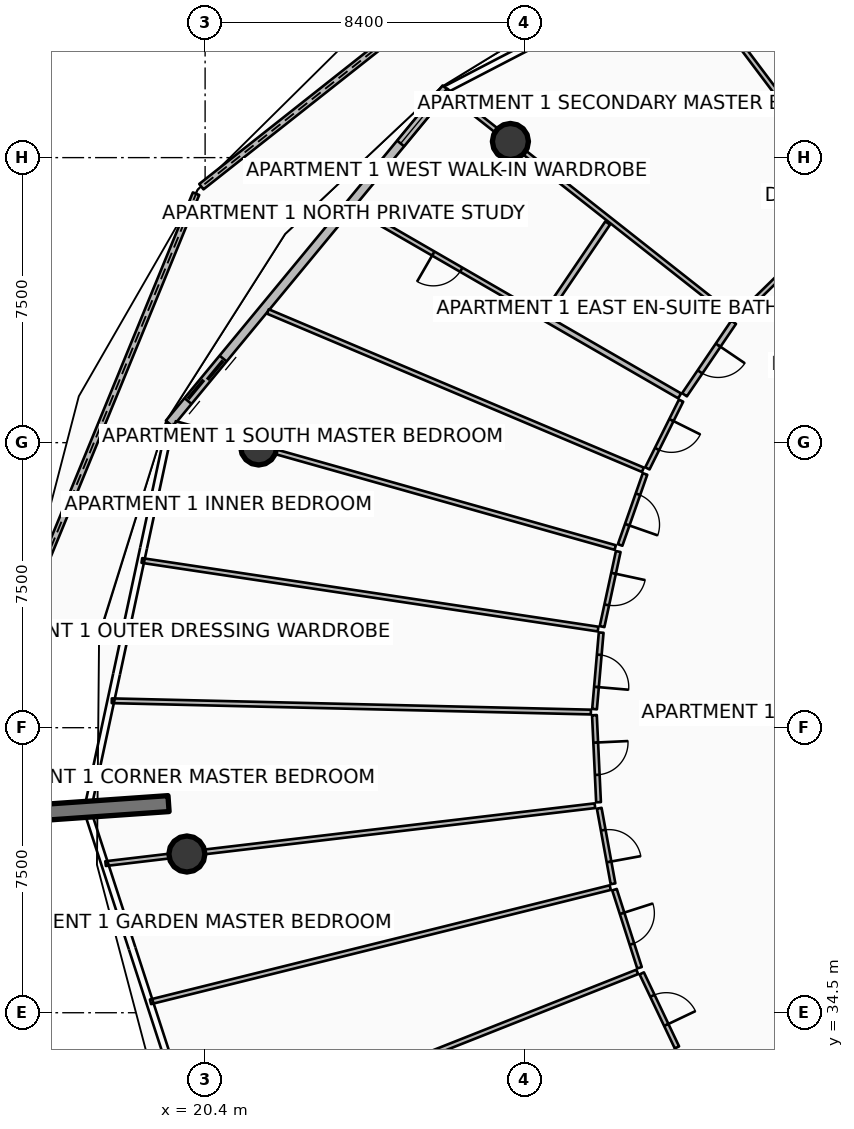
"""IFC4 building model, lengths in metres.
Left out: names, types, materials, properties, quantities, classifications, styles, units other than length and angle.
Written with IfcOpenShell. Run it as: python <this file> out.ifc"""

import sys

from ifc_helpers import new_model, si_unit, direction, frame, frame_2d, origin, origin_2d, place, context, subcontext, project, spatial, polyline, rectangle, circle, outline, extrude, element, fill, save


model = new_model("IFC4")
c1 = context("Model", 3, precision=1e-05, world=origin(), true_north=direction((0.0, 1.0)))
c2 = subcontext(c1, "Body", "Model", "MODEL_VIEW")
j1 = project(units=[si_unit("LENGTHUNIT", "METRE"), si_unit("PLANEANGLEUNIT", "RADIAN")], contexts=[c1])
p1 = place(None, origin())
s1 = spatial("IfcSite", under=j1, at=p1, CompositionType="ELEMENT")
p2 = place(p1, origin())
s2 = spatial("IfcBuilding", under=s1, at=p2, CompositionType="ELEMENT")
p3 = place(p2, frame((0.0, 0.0, 267.5)))
s3 = spatial("IfcBuildingStorey", under=s2, at=p3, CompositionType="ELEMENT", Elevation=267.5)
p4 = place(p3, frame((19.438, 40.003, 0.0), z_axis=(0.0, 0.0, 1.0), x_axis=(-0.997563824095, -0.069759707979, 0.0)))
e1 = element("IfcWall", 1, at=p4, inside=s3, PredefinedType="SOLIDWALL", context=c2, shape_type="SweptSolid", body=[
    extrude(rectangle(XDim=3.5, YDim=0.42, at=frame_2d((1.75, 0.0))), origin(), (0.0, 0.0, 1.0), 3.85),
])
for number, where, z_axis, x_axis in (
    (2, (28.434, 57.425, 0.0), (0.0, 0.0, 1.0), (1.0, 0.0, 0.0)),
    (3, (21.809, 49.387, 0.0), (0.0, 0.0, 1.0), (1.0, 0.0, 0.0)),
    (4, (19.92, 38.677, 0.0), (0.0, 0.0, 1.0), (1.0, 0.0, 0.0)),
):
    element("IfcColumn", number, at=place(p3, frame(where, z_axis=z_axis, x_axis=x_axis)), inside=s3, PredefinedType="COLUMN", context=c2, shape_type="SweptSolid", body=[
        extrude(circle(Radius=0.475, at=origin_2d()), origin(), (0.0, 0.0, 1.0), 3.59),
    ])
p5 = place(p3, frame((29.443, 63.461, 0.0), z_axis=(0.0, 0.0, 1.0), x_axis=(-0.784536716277, -0.620082366153, 0.0)))
e5 = element("IfcWall", 5, at=p5, inside=s3, PredefinedType="PARAPET", context=c2, shape_type="SweptSolid", body=[
    extrude(outline(polyline([(0.0, 0.0), (11.652, 0.0), (11.652, 1.832), (5.826, 1.853), (0.0, 1.756), (0.0, 0.0)])), frame((0.0, 0.09, 0.0), z_axis=(0.0, -1.0, 0.0), x_axis=(1.0, 0.0, 0.0)), (0.0, 0.0, 1.0), 0.18),
])
p6 = place(p3, frame((20.162, 56.05, 0.0), z_axis=(0.0, 0.0, 1.0), x_axis=(-0.3796059491, -0.92514827104, 0.0)))
e6 = element("IfcWall", 6, at=p6, inside=s3, PredefinedType="PARAPET", context=c2, shape_type="SweptSolid", body=[
    extrude(outline(polyline([(0.0, 0.0), (12.209, 0.0), (12.208, 1.497), (6.104, 1.696), (0.0, 1.832), (0.0, 0.0)])), frame((0.0, 0.09, 0.0), z_axis=(0.0, -1.0, 0.0), x_axis=(1.0, 0.0, 0.0)), (0.0, 0.0, 1.0), 0.18),
])
p7 = place(p3, frame((26.742, 58.822, 0.0), z_axis=(0.0, 0.0, 1.0), x_axis=(-0.636680093065, -0.771128043255, 0.0)))
e7 = element("IfcWall", 7, at=p7, inside=s3, PredefinedType="SOLIDWALL", context=c2, shape_type="SweptSolid", body=[
    extrude(rectangle(XDim=11.438, YDim=0.24, at=frame_2d((5.719, 0.0))), origin(), (0.0, 0.0, 1.0), 2.54),
])
p8 = place(p7, frame((9.218, 0.0, 0.0)))
e8 = element("IfcOpeningElement", 8, at=p8, cuts=e7, PredefinedType="OPENING", context=c2, shape_type="SweptSolid", body=[
    extrude(rectangle(XDim=1.45, YDim=2.15, at=frame_2d((0.725, 1.075))), frame((0.0, 0.13, 0.0), z_axis=(0.0, -1.0, 0.0), x_axis=(1.0, 0.0, 0.0)), (0.0, 0.0, 1.0), 0.26),
])
p9 = place(p7, frame((0.28, 0.0, 0.65)))
e9 = element("IfcOpeningElement", 9, at=p9, cuts=e7, PredefinedType="OPENING", context=c2, shape_type="SweptSolid", body=[
    extrude(rectangle(XDim=1.6, YDim=1.5, at=frame_2d((0.8, 0.75))), frame((0.0, 0.13, 0.0), z_axis=(0.0, -1.0, 0.0), x_axis=(1.0, 0.0, 0.0)), (0.0, 0.0, 1.0), 0.26),
])
p10 = place(p3, frame((37.509, 55.949, 0.0), z_axis=(0.0, 0.0, 1.0), x_axis=(-0.60104674722, 0.799213868534, 0.0)))
e10 = element("IfcWall", 10, at=p10, inside=s3, PredefinedType="PARTITIONING", context=c2, shape_type="SweptSolid", body=[
    extrude(rectangle(XDim=7.572, YDim=0.125, at=frame_2d((3.786, 0.0))), origin(), (0.0, 0.0, 1.0), 3.03),
])
p11 = place(p3, frame((37.506, 55.822, 0.0), z_axis=(0.0, 0.0, 1.0), x_axis=(-0.715105814901, -0.699016218334, 0.0)))
e11 = element("IfcWall", 11, at=p11, inside=s3, PredefinedType="PARTITIONING", context=c2, shape_type="SweptSolid", body=[
    extrude(rectangle(XDim=4.294, YDim=0.125, at=frame_2d((2.147, 0.0))), origin(), (0.0, 0.0, 1.0), 2.957),
])
p12 = place(p11, frame((1.697, 0.0, 0.0)))
e12 = element("IfcOpeningElement", 12, at=p12, cuts=e11, PredefinedType="OPENING", context=c2, shape_type="SweptSolid", body=[
    extrude(rectangle(XDim=0.9, YDim=2.08, at=frame_2d((0.45, 1.04))), frame((0.0, 0.073, 0.0), z_axis=(0.0, -1.0, 0.0), x_axis=(1.0, 0.0, 0.0)), (0.0, 0.0, 1.0), 0.145),
])
p13 = place(p3, frame((34.285, 52.812, 0.0), z_axis=(0.0, 0.0, 1.0), x_axis=(-0.785324921183, 0.619083813526, 0.0)))
e13 = element("IfcWall", 13, at=p13, inside=s3, PredefinedType="PARTITIONING", context=c2, shape_type="SweptSolid", body=[
    extrude(rectangle(XDim=9.621, YDim=0.125, at=frame_2d((4.811, 0.0))), origin(), (0.0, 0.0, 1.0), 2.957),
])
p14 = place(p3, frame((34.308, 52.667, 0.0), z_axis=(0.0, 0.0, 1.0), x_axis=(-0.561141072409, -0.827720180288, 0.0)))
e14 = element("IfcWall", 14, at=p14, inside=s3, PredefinedType="PARTITIONING", context=c2, shape_type="SweptSolid", body=[
    extrude(rectangle(XDim=2.303, YDim=0.15, at=frame_2d((1.152, 0.0))), origin(), (0.0, 0.0, 1.0), 2.957),
])
p15 = place(p14, frame((0.727, 0.0, 0.0)))
e15 = element("IfcOpeningElement", 15, at=p15, cuts=e14, PredefinedType="OPENING", context=c2, shape_type="SweptSolid", body=[
    extrude(rectangle(XDim=0.85, YDim=2.06, at=frame_2d((0.425, 1.03))), frame((0.0, 0.085, 0.0), z_axis=(0.0, -1.0, 0.0), x_axis=(1.0, 0.0, 0.0)), (0.0, 0.0, 1.0), 0.17),
])
p16 = place(p3, frame((30.994, 55.28, 0.0), z_axis=(0.0, 0.0, 1.0), x_axis=(-0.561093021969, -0.827752753361, 0.0)))
e16 = element("IfcWall", 16, at=p16, inside=s3, PredefinedType="PARTITIONING", context=c2, shape_type="SweptSolid", body=[
    extrude(rectangle(XDim=2.91, YDim=0.15, at=frame_2d((1.455, 0.0))), origin(), (0.0, 0.0, 1.0), 2.957),
])
p17 = place(p3, frame((32.887, 50.731, 0.0), z_axis=(0.0, 0.0, 1.0), x_axis=(-0.865897249189, 0.500221904605, 0.0)))
e17 = element("IfcWall", 17, at=p17, inside=s3, PredefinedType="PARTITIONING", context=c2, shape_type="SweptSolid", body=[
    extrude(rectangle(XDim=4.09, YDim=0.15, at=frame_2d((2.045, 0.0))), origin(), (0.0, 0.0, 1.0), 3.03),
])
p18 = place(p3, frame((29.233, 52.842, 0.0), z_axis=(0.0, 0.0, 1.0), x_axis=(-0.865885749935, 0.500241809588, 0.0)))
e18 = element("IfcWall", 18, at=p18, inside=s3, PredefinedType="PARTITIONING", context=c2, shape_type="SweptSolid", body=[
    extrude(rectangle(XDim=5.683, YDim=0.125, at=frame_2d((2.841, 0.0))), origin(), (0.0, 0.0, 1.0), 3.03),
])
p19 = place(p18, frame((2.417, 0.0, 0.0)))
e19 = element("IfcOpeningElement", 19, at=p19, cuts=e18, PredefinedType="OPENING", context=c2, shape_type="SweptSolid", body=[
    extrude(rectangle(XDim=0.85, YDim=2.06, at=frame_2d((0.425, 1.03))), frame((0.0, 0.073, 0.0), z_axis=(0.0, -1.0, 0.0), x_axis=(1.0, 0.0, 0.0)), (0.0, 0.0, 1.0), 0.145),
])
p20 = place(p3, frame((31.92, 48.787, 0.0), z_axis=(0.0, 0.0, 1.0), x_axis=(-0.92130726737, 0.388835336731, 0.0)))
e20 = element("IfcWall", 20, at=p20, inside=s3, PredefinedType="PARTITIONING", context=c2, shape_type="SweptSolid", body=[
    extrude(rectangle(XDim=10.712, YDim=0.125, at=frame_2d((5.356, 0.0))), origin(), (0.0, 0.0, 1.0), 3.03),
])
p21 = place(p3, frame((32.925, 50.605, 0.0), z_axis=(0.0, 0.0, 1.0), x_axis=(-0.445446150764, -0.895308732656, 0.0)))
e21 = element("IfcWall", 21, at=p21, inside=s3, PredefinedType="PARTITIONING", context=c2, shape_type="SweptSolid", body=[
    extrude(rectangle(XDim=1.99, YDim=0.125, at=frame_2d((0.995, 0.0))), origin(), (0.0, 0.0, 1.0), 3.03),
])
p22 = place(p21, frame((0.57, 0.0, 0.0)))
e22 = element("IfcOpeningElement", 22, at=p22, cuts=e21, PredefinedType="OPENING", context=c2, shape_type="SweptSolid", body=[
    extrude(rectangle(XDim=0.85, YDim=2.06, at=frame_2d((0.425, 1.03))), frame((0.0, 0.073, 0.0), z_axis=(0.0, -1.0, 0.0), x_axis=(1.0, 0.0, 0.0)), (0.0, 0.0, 1.0), 0.145),
])
p23 = place(p3, frame((31.976, 48.677, 0.0), z_axis=(0.0, 0.0, 1.0), x_axis=(-0.330762244327, -0.943714118644, 0.0)))
e23 = element("IfcWall", 23, at=p23, inside=s3, PredefinedType="PARTITIONING", context=c2, shape_type="SweptSolid", body=[
    extrude(rectangle(XDim=1.98, YDim=0.125, at=frame_2d((0.99, 0.0))), origin(), (0.0, 0.0, 1.0), 2.957),
])
p24 = place(p23, frame((0.565, 0.0, 0.0)))
e24 = element("IfcOpeningElement", 24, at=p24, cuts=e23, PredefinedType="OPENING", context=c2, shape_type="SweptSolid", body=[
    extrude(rectangle(XDim=0.85, YDim=2.06, at=frame_2d((0.425, 1.03))), frame((0.0, 0.073, 0.0), z_axis=(0.0, -1.0, 0.0), x_axis=(1.0, 0.0, 0.0)), (0.0, 0.0, 1.0), 0.145),
])
p25 = place(p3, frame((31.192, 46.74, 0.0), z_axis=(0.0, 0.0, 1.0), x_axis=(-0.962454841417, 0.271441850554, 0.0)))
e25 = element("IfcWall", 25, at=p25, inside=s3, PredefinedType="PARTITIONING", context=c2, shape_type="SweptSolid", body=[
    extrude(rectangle(XDim=12.031, YDim=0.125, at=frame_2d((6.016, 0.0))), origin(), (0.0, 0.0, 1.0), 2.957),
])
p26 = place(p3, frame((30.74, 44.595, 0.0), z_axis=(0.0, 0.0, 1.0), x_axis=(-0.988886285118, 0.148673854813, 0.0)))
e26 = element("IfcWall", 26, at=p26, inside=s3, PredefinedType="PARTITIONING", context=c2, shape_type="SweptSolid", body=[
    extrude(rectangle(XDim=12.139, YDim=0.125, at=frame_2d((6.069, 0.0))), origin(), (0.0, 0.0, 1.0), 3.03),
])
p27 = place(p3, frame((30.551, 42.411, 0.0), z_axis=(0.0, 0.0, 1.0), x_axis=(-0.999722360085, 0.023562740626, 0.0)))
e27 = element("IfcWall", 27, at=p27, inside=s3, PredefinedType="PARTITIONING", context=c2, shape_type="SweptSolid", body=[
    extrude(rectangle(XDim=12.61, YDim=0.125, at=frame_2d((6.305, 0.0))), origin(), (0.0, 0.0, 1.0), 3.03),
])
p28 = place(p3, frame((31.271, 46.635, 0.0), z_axis=(0.0, 0.0, 1.0), x_axis=(-0.210477911791, -0.97759861326, 0.0)))
e28 = element("IfcWall", 28, at=p28, inside=s3, PredefinedType="PARTITIONING", context=c2, shape_type="SweptSolid", body=[
    extrude(rectangle(XDim=2.021, YDim=0.125, at=frame_2d((1.01, 0.0))), origin(), (0.0, 0.0, 1.0), 2.957),
])
p29 = place(p28, frame((0.585, 0.0, 0.0)))
e29 = element("IfcOpeningElement", 29, at=p29, cuts=e28, PredefinedType="OPENING", context=c2, shape_type="SweptSolid", body=[
    extrude(rectangle(XDim=0.85, YDim=2.06, at=frame_2d((0.425, 1.03))), frame((0.0, 0.073, 0.0), z_axis=(0.0, -1.0, 0.0), x_axis=(1.0, 0.0, 0.0)), (0.0, 0.0, 1.0), 0.145),
])
p30 = place(p3, frame((30.822, 44.502, 0.0), z_axis=(0.0, 0.0, 1.0), x_axis=(-0.086275045339, -0.996271356886, 0.0)))
e30 = element("IfcWall", 30, at=p30, inside=s3, PredefinedType="PARTITIONING", context=c2, shape_type="SweptSolid", body=[
    extrude(rectangle(XDim=2.021, YDim=0.125, at=frame_2d((1.01, 0.0))), origin(), (0.0, 0.0, 1.0), 3.03),
])
p31 = place(p30, frame((0.585, 0.0, 0.0)))
e31 = element("IfcOpeningElement", 31, at=p31, cuts=e30, PredefinedType="OPENING", context=c2, shape_type="SweptSolid", body=[
    extrude(rectangle(XDim=0.85, YDim=2.06, at=frame_2d((0.425, 1.03))), frame((0.0, 0.073, 0.0), z_axis=(0.0, -1.0, 0.0), x_axis=(1.0, 0.0, 0.0)), (0.0, 0.0, 1.0), 0.145),
])
p32 = place(p3, frame((30.645, 42.329, 0.0), z_axis=(0.0, 0.0, 1.0), x_axis=(0.047175561804, -0.998886613369, 0.0)))
e32 = element("IfcWall", 32, at=p32, inside=s3, PredefinedType="PARTITIONING", context=c2, shape_type="SweptSolid", body=[
    extrude(rectangle(XDim=2.292, YDim=0.125, at=frame_2d((1.146, 0.0))), origin(), (0.0, 0.0, 1.0), 2.957),
])
p33 = place(p32, frame((0.721, 0.0, 0.0)))
e33 = element("IfcOpeningElement", 33, at=p33, cuts=e32, PredefinedType="OPENING", context=c2, shape_type="SweptSolid", body=[
    extrude(rectangle(XDim=0.85, YDim=2.06, at=frame_2d((0.425, 1.03))), frame((0.0, 0.073, 0.0), z_axis=(0.0, -1.0, 0.0), x_axis=(1.0, 0.0, 0.0)), (0.0, 0.0, 1.0), 0.145),
])
p34 = place(p3, frame((30.657, 39.947, 0.0), z_axis=(0.0, 0.0, 1.0), x_axis=(-0.99306861519, -0.117536060525, 0.0)))
e34 = element("IfcWall", 34, at=p34, inside=s3, PredefinedType="PARTITIONING", context=c2, shape_type="SweptSolid", body=[
    extrude(rectangle(XDim=12.966, YDim=0.125, at=frame_2d((6.483, 0.0))), origin(), (0.0, 0.0, 1.0), 2.957),
])
p35 = place(p3, frame((31.061, 37.792, 0.0), z_axis=(0.0, 0.0, 1.0), x_axis=(-0.970505468857, -0.241079105105, 0.0)))
e35 = element("IfcWall", 35, at=p35, inside=s3, PredefinedType="PARTITIONING", context=c2, shape_type="SweptSolid", body=[
    extrude(rectangle(XDim=12.465, YDim=0.125, at=frame_2d((6.233, 0.0))), origin(), (0.0, 0.0, 1.0), 3.03),
])
p36 = place(p3, frame((31.772, 35.575, 0.0), z_axis=(0.0, 0.0, 1.0), x_axis=(-0.929777389871, -0.368122269476, 0.0)))
e36 = element("IfcWall", 36, at=p36, inside=s3, PredefinedType="PARTITIONING", context=c2, shape_type="SweptSolid", body=[
    extrude(rectangle(XDim=12.45, YDim=0.125, at=frame_2d((6.225, 0.0))), origin(), (0.0, 0.0, 1.0), 3.03),
])
p37 = place(p3, frame((30.771, 39.88, 0.0), z_axis=(0.0, 0.0, 1.0), x_axis=(0.17966153972, -0.983728484464, 0.0)))
e37 = element("IfcWall", 37, at=p37, inside=s3, PredefinedType="PARTITIONING", context=c2, shape_type="SweptSolid", body=[
    extrude(rectangle(XDim=2.021, YDim=0.125, at=frame_2d((1.01, 0.0))), origin(), (0.0, 0.0, 1.0), 2.957),
])
p38 = place(p37, frame((0.585, 0.0, 0.0)))
e38 = element("IfcOpeningElement", 38, at=p38, cuts=e37, PredefinedType="OPENING", context=c2, shape_type="SweptSolid", body=[
    extrude(rectangle(XDim=0.85, YDim=2.06, at=frame_2d((0.425, 1.03))), frame((0.0, 0.073, 0.0), z_axis=(0.0, -1.0, 0.0), x_axis=(1.0, 0.0, 0.0)), (0.0, 0.0, 1.0), 0.145),
])
p39 = place(p3, frame((31.173, 37.738, 0.0), z_axis=(0.0, 0.0, 1.0), x_axis=(0.305305543728, -0.952254443397, 0.0)))
e39 = element("IfcWall", 39, at=p39, inside=s3, PredefinedType="PARTITIONING", context=c2, shape_type="SweptSolid", body=[
    extrude(rectangle(XDim=2.157, YDim=0.125, at=frame_2d((1.078, 0.0))), origin(), (0.0, 0.0, 1.0), 3.03),
])
p40 = place(p39, frame((0.653, 0.0, 0.0)))
e40 = element("IfcOpeningElement", 40, at=p40, cuts=e39, PredefinedType="OPENING", context=c2, shape_type="SweptSolid", body=[
    extrude(rectangle(XDim=0.85, YDim=2.06, at=frame_2d((0.425, 1.03))), frame((0.0, 0.073, 0.0), z_axis=(0.0, -1.0, 0.0), x_axis=(1.0, 0.0, 0.0)), (0.0, 0.0, 1.0), 0.145),
])
p41 = place(p3, frame((31.89, 35.536, 0.0), z_axis=(0.0, 0.0, 1.0), x_axis=(0.429375439277, -0.90312608873, 0.0)))
e41 = element("IfcWall", 41, at=p41, inside=s3, PredefinedType="PARTITIONING", context=c2, shape_type="SweptSolid", body=[
    extrude(rectangle(XDim=2.157, YDim=0.125, at=frame_2d((1.078, 0.0))), origin(), (0.0, 0.0, 1.0), 2.957),
])
p42 = place(p41, frame((0.653, 0.0, 0.0)))
e42 = element("IfcOpeningElement", 42, at=p42, cuts=e41, PredefinedType="OPENING", context=c2, shape_type="SweptSolid", body=[
    extrude(rectangle(XDim=0.85, YDim=2.06, at=frame_2d((0.425, 1.03))), frame((0.0, 0.073, 0.0), z_axis=(0.0, -1.0, 0.0), x_axis=(1.0, 0.0, 0.0)), (0.0, 0.0, 1.0), 0.145),
])
p43 = place(p8, origin())
e43 = element("IfcDoor", 43, at=p43, inside=s3, OperationType="DOUBLE_DOOR_SLIDING", PredefinedType="DOOR", context=c2, shape_type="SweptSolid", body=[
    extrude(rectangle(XDim=1.45, YDim=2.15, at=frame_2d((0.725, 1.075))), frame((0.0, 0.025, 0.0), z_axis=(0.0, -1.0, 0.0), x_axis=(1.0, 0.0, 0.0)), (0.0, 0.0, 1.0), 0.05),
])
fill(e8, e43)
p44 = place(p9, origin())
e44 = element("IfcWindow", 44, at=p44, inside=s3, PartitioningType="SINGLE_PANEL", PredefinedType="WINDOW", context=c2, shape_type="SweptSolid", body=[
    extrude(rectangle(XDim=1.6, YDim=1.5, at=frame_2d((0.8, 0.75))), frame((0.0, 0.03, 0.0), z_axis=(0.0, -1.0, 0.0), x_axis=(1.0, 0.0, 0.0)), (0.0, 0.0, 1.0), 0.06),
])
fill(e9, e44)
p45 = place(p15, origin())
e45 = element("IfcDoor", 45, at=p45, inside=s3, OperationType="SINGLE_SWING_LEFT", PredefinedType="DOOR", context=c2, shape_type="SweptSolid", body=[
    extrude(rectangle(XDim=0.85, YDim=2.06, at=frame_2d((0.425, 1.03))), frame((0.0, 0.025, 0.0), z_axis=(0.0, -1.0, 0.0), x_axis=(1.0, 0.0, 0.0)), (0.0, 0.0, 1.0), 0.05),
])
fill(e15, e45)
p46 = place(p19, origin())
e46 = element("IfcDoor", 46, at=p46, inside=s3, OperationType="SINGLE_SWING_RIGHT", PredefinedType="DOOR", context=c2, shape_type="SweptSolid", body=[
    extrude(rectangle(XDim=0.85, YDim=2.06, at=frame_2d((0.425, 1.03))), frame((0.0, 0.025, 0.0), z_axis=(0.0, -1.0, 0.0), x_axis=(1.0, 0.0, 0.0)), (0.0, 0.0, 1.0), 0.05),
])
fill(e19, e46)
p47 = place(p22, origin())
e47 = element("IfcDoor", 47, at=p47, inside=s3, OperationType="SINGLE_SWING_LEFT", PredefinedType="DOOR", context=c2, shape_type="SweptSolid", body=[
    extrude(rectangle(XDim=0.85, YDim=2.06, at=frame_2d((0.425, 1.03))), frame((0.0, 0.025, 0.0), z_axis=(0.0, -1.0, 0.0), x_axis=(1.0, 0.0, 0.0)), (0.0, 0.0, 1.0), 0.05),
])
fill(e22, e47)
p48 = place(p24, origin())
e48 = element("IfcDoor", 48, at=p48, inside=s3, OperationType="SINGLE_SWING_RIGHT", PredefinedType="DOOR", context=c2, shape_type="SweptSolid", body=[
    extrude(rectangle(XDim=0.85, YDim=2.06, at=frame_2d((0.425, 1.03))), frame((0.0, 0.025, 0.0), z_axis=(0.0, -1.0, 0.0), x_axis=(1.0, 0.0, 0.0)), (0.0, 0.0, 1.0), 0.05),
])
fill(e24, e48)
p49 = place(p29, origin())
e49 = element("IfcDoor", 49, at=p49, inside=s3, OperationType="SINGLE_SWING_LEFT", PredefinedType="DOOR", context=c2, shape_type="SweptSolid", body=[
    extrude(rectangle(XDim=0.85, YDim=2.06, at=frame_2d((0.425, 1.03))), frame((0.0, 0.025, 0.0), z_axis=(0.0, -1.0, 0.0), x_axis=(1.0, 0.0, 0.0)), (0.0, 0.0, 1.0), 0.05),
])
fill(e29, e49)
p50 = place(p31, origin())
e50 = element("IfcDoor", 50, at=p50, inside=s3, OperationType="SINGLE_SWING_RIGHT", PredefinedType="DOOR", context=c2, shape_type="SweptSolid", body=[
    extrude(rectangle(XDim=0.85, YDim=2.06, at=frame_2d((0.425, 1.03))), frame((0.0, 0.025, 0.0), z_axis=(0.0, -1.0, 0.0), x_axis=(1.0, 0.0, 0.0)), (0.0, 0.0, 1.0), 0.05),
])
fill(e31, e50)
p51 = place(p33, origin())
e51 = element("IfcDoor", 51, at=p51, inside=s3, OperationType="SINGLE_SWING_LEFT", PredefinedType="DOOR", context=c2, shape_type="SweptSolid", body=[
    extrude(rectangle(XDim=0.85, YDim=2.06, at=frame_2d((0.425, 1.03))), frame((0.0, 0.025, 0.0), z_axis=(0.0, -1.0, 0.0), x_axis=(1.0, 0.0, 0.0)), (0.0, 0.0, 1.0), 0.05),
])
fill(e33, e51)
p52 = place(p38, origin())
e52 = element("IfcDoor", 52, at=p52, inside=s3, OperationType="SINGLE_SWING_RIGHT", PredefinedType="DOOR", context=c2, shape_type="SweptSolid", body=[
    extrude(rectangle(XDim=0.85, YDim=2.06, at=frame_2d((0.425, 1.03))), frame((0.0, 0.025, 0.0), z_axis=(0.0, -1.0, 0.0), x_axis=(1.0, 0.0, 0.0)), (0.0, 0.0, 1.0), 0.05),
])
fill(e38, e52)
p53 = place(p40, origin())
e53 = element("IfcDoor", 53, at=p53, inside=s3, OperationType="SINGLE_SWING_LEFT", PredefinedType="DOOR", context=c2, shape_type="SweptSolid", body=[
    extrude(rectangle(XDim=0.85, YDim=2.06, at=frame_2d((0.425, 1.03))), frame((0.0, 0.025, 0.0), z_axis=(0.0, -1.0, 0.0), x_axis=(1.0, 0.0, 0.0)), (0.0, 0.0, 1.0), 0.05),
])
fill(e40, e53)
p54 = place(p42, origin())
e54 = element("IfcDoor", 54, at=p54, inside=s3, OperationType="SINGLE_SWING_RIGHT", PredefinedType="DOOR", context=c2, shape_type="SweptSolid", body=[
    extrude(rectangle(XDim=0.85, YDim=2.06, at=frame_2d((0.425, 1.03))), frame((0.0, 0.025, 0.0), z_axis=(0.0, -1.0, 0.0), x_axis=(1.0, 0.0, 0.0)), (0.0, 0.0, 1.0), 0.05),
])
fill(e42, e54)
save(model, sys.argv[1])
